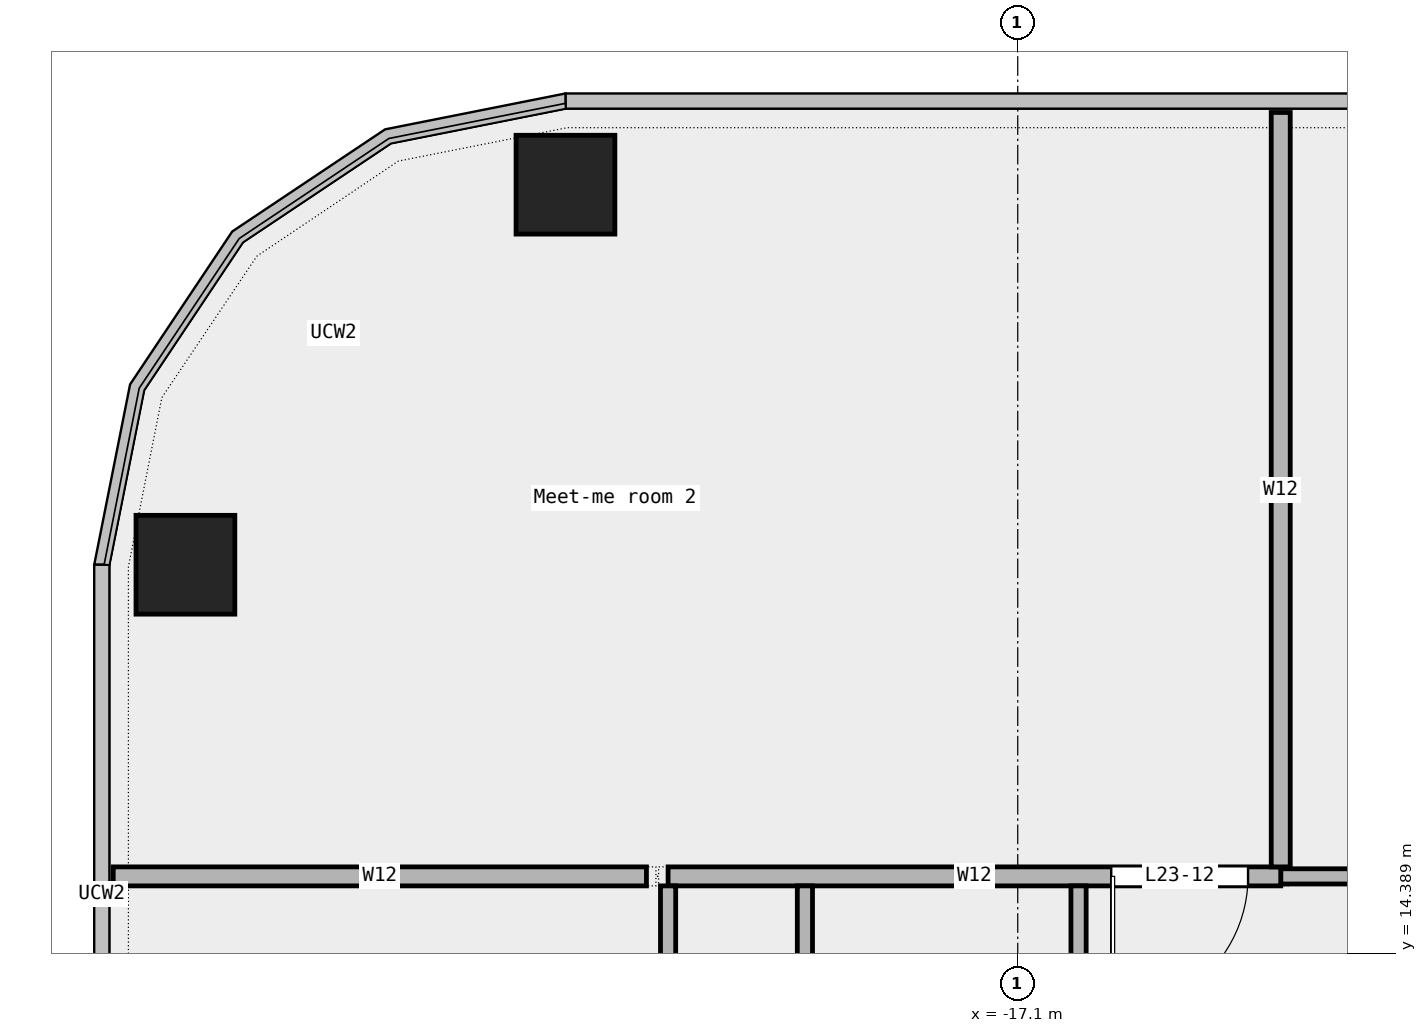
"""IFC4 building model, lengths in metres.
Left out: names, types, materials, properties, quantities, classifications, styles, units other than length and angle.
Written with IfcOpenShell. Run it as: python <this file> out.ifc"""

import sys

from ifc_helpers import new_model, si_unit, direction, frame, frame_2d, origin, origin_2d, place, context, subcontext, project, spatial, rectangle, extrude, element, fill, save


model = new_model("IFC4")
c1 = context("Model", 3, precision=1e-05, world=origin(), true_north=direction((0.0, 1.0)))
c2 = subcontext(c1, "Body", "Model", "MODEL_VIEW")
j1 = project(units=[si_unit("LENGTHUNIT", "METRE"), si_unit("PLANEANGLEUNIT", "RADIAN")], contexts=[c1])
p1 = place(None, origin())
s1 = spatial("IfcSite", under=j1, at=p1, CompositionType="ELEMENT")
p2 = place(p1, origin())
s2 = spatial("IfcBuilding", under=s1, at=p2, CompositionType="ELEMENT")
p3 = place(p2, frame((0.0, 0.0, 117.1)))
s3 = spatial("IfcBuildingStorey", under=s2, at=p3, CompositionType="ELEMENT", Elevation=117.1)
for number, where, z_axis, x_axis in (
    (1, (-23.05, 24.5, 0.0), (0.0, 0.0, 1.0), (1.0, 0.0, 0.0)),
    (2, (-28.05, 19.5, 0.0), (0.0, 0.0, 1.0), (1.0, 0.0, 0.0)),
):
    element("IfcColumn", number, at=place(p3, frame(where, z_axis=z_axis, x_axis=x_axis)), inside=s3, PredefinedType="COLUMN", context=c2, shape_type="SweptSolid", body=[
        extrude(rectangle(XDim=1.3, YDim=1.3, at=origin_2d()), origin(), (0.0, 0.0, 1.0), 4.05),
    ])
p4 = place(p3, frame((-13.64, 15.4, 0.0), z_axis=(0.0, 0.0, 1.0), x_axis=(1.0, 0.0, 0.0)))
e3 = element("IfcWall", 3, at=p4, inside=s3, PredefinedType="PARTITIONING", context=c2, shape_type="SweptSolid", body=[
    extrude(rectangle(XDim=12.125, YDim=0.2, at=frame_2d((6.062, 0.0))), origin(), (0.0, 0.0, 1.0), 4.05),
])
p5 = place(p4, frame((5.312, 0.0, 0.0)))
e4 = element("IfcOpeningElement", 4, at=p5, cuts=e3, PredefinedType="OPENING", context=c2, shape_type="SweptSolid", body=[
    extrude(rectangle(XDim=1.5, YDim=2.1, at=frame_2d((0.75, 1.05))), frame((0.0, 0.112, 0.0), z_axis=(0.0, -1.0, 0.0), x_axis=(1.0, 0.0, 0.0)), (0.0, 0.0, 1.0), 0.224),
])
p6 = place(p3, frame((-29.0, 15.4, 0.0), z_axis=(0.0, 0.0, 1.0), x_axis=(1.0, 0.0, 0.0)))
e5 = element("IfcWall", 5, at=p6, inside=s3, PredefinedType="PARTITIONING", context=c2, shape_type="SweptSolid", body=[
    extrude(rectangle(XDim=7.015, YDim=0.25, at=frame_2d((3.507, 0.0))), origin(), (0.0, 0.0, 1.0), 4.05),
])
p7 = place(p3, frame((-21.7, 15.4, 0.0), z_axis=(0.0, 0.0, 1.0), x_axis=(1.0, 0.0, 0.0)))
e6 = element("IfcWall", 6, at=p7, inside=s3, PredefinedType="PARTITIONING", context=c2, shape_type="SweptSolid", body=[
    extrude(rectangle(XDim=8.06, YDim=0.25, at=frame_2d((4.03, 0.0))), origin(), (0.0, 0.0, 1.0), 4.05),
])
p8 = place(p7, frame((5.83, 0.0, 0.0)))
e7 = element("IfcOpeningElement", 7, at=p8, cuts=e6, PredefinedType="OPENING", context=c2, shape_type="SweptSolid", body=[
    extrude(rectangle(XDim=1.8, YDim=2.1, at=frame_2d((0.9, 1.05))), frame((0.0, 0.137, 0.0), z_axis=(0.0, -1.0, 0.0), x_axis=(1.0, 0.0, 0.0)), (0.0, 0.0, 1.0), 0.274),
])
p9 = place(p3, frame((-21.7, -8.975, 0.0), z_axis=(0.0, 0.0, 1.0), x_axis=(0.0, 1.0, 0.0)))
e8 = element("IfcWall", 8, at=p9, inside=s3, PredefinedType="PARTITIONING", context=c2, shape_type="SweptSolid", body=[
    extrude(rectangle(XDim=24.25, YDim=0.2, at=frame_2d((12.125, 0.0))), origin(), (0.0, 0.0, 1.0), 4.05),
])
p10 = place(p9, frame((2.805, 0.0, 0.0)))
e9 = element("IfcOpeningElement", 9, at=p10, cuts=e8, PredefinedType="OPENING", context=c2, shape_type="SweptSolid", body=[
    extrude(rectangle(XDim=1.2, YDim=2.1, at=frame_2d((0.6, 1.05))), frame((0.0, 0.112, 0.0), z_axis=(0.0, -1.0, 0.0), x_axis=(1.0, 0.0, 0.0)), (0.0, 0.0, 1.0), 0.224),
])
p11 = place(p9, frame((21.58, 0.0, 0.0)))
e10 = element("IfcOpeningElement", 10, at=p11, cuts=e8, PredefinedType="OPENING", context=c2, shape_type="SweptSolid", body=[
    extrude(rectangle(XDim=0.9, YDim=2.1, at=frame_2d((0.45, 1.05))), frame((0.0, 0.112, 0.0), z_axis=(0.0, -1.0, 0.0), x_axis=(1.0, 0.0, 0.0)), (0.0, 0.0, 1.0), 0.224),
])
p12 = place(p9, frame((12.71, 0.0, 0.0)))
e11 = element("IfcOpeningElement", 11, at=p12, cuts=e8, PredefinedType="OPENING", context=c2, shape_type="SweptSolid", body=[
    extrude(rectangle(XDim=1.2, YDim=2.1, at=frame_2d((0.6, 1.05))), frame((0.0, 0.112, 0.0), z_axis=(0.0, -1.0, 0.0), x_axis=(1.0, 0.0, 0.0)), (0.0, 0.0, 1.0), 0.224),
])
p13 = place(p3, frame((-19.9, 9.85, 0.0), z_axis=(0.0, 0.0, 1.0), x_axis=(0.0, 1.0, 0.0)))
e12 = element("IfcWall", 12, at=p13, inside=s3, PredefinedType="PARTITIONING", context=c2, shape_type="SweptSolid", body=[
    extrude(rectangle(XDim=5.425, YDim=0.2, at=frame_2d((2.712, 0.0))), origin(), (0.0, 0.0, 1.0), 4.05),
])
p14 = place(p3, frame((-16.3, 11.75, 0.0), z_axis=(0.0, 0.0, 1.0), x_axis=(0.0, 1.0, 0.0)))
e13 = element("IfcWall", 13, at=p14, inside=s3, PredefinedType="PARTITIONING", context=c2, shape_type="SweptSolid", body=[
    extrude(rectangle(XDim=3.525, YDim=0.2, at=frame_2d((1.762, 0.0))), origin(), (0.0, 0.0, 1.0), 4.05),
])
p15 = place(p14, frame((1.312, 0.0, 0.0)))
e14 = element("IfcOpeningElement", 14, at=p15, cuts=e13, PredefinedType="OPENING", context=c2, shape_type="SweptSolid", body=[
    extrude(rectangle(XDim=0.9, YDim=2.1, at=frame_2d((0.45, 1.05))), frame((0.0, 0.112, 0.0), z_axis=(0.0, -1.0, 0.0), x_axis=(1.0, 0.0, 0.0)), (0.0, 0.0, 1.0), 0.224),
])
p16 = place(p3, frame((-13.64, 15.525, 0.0), z_axis=(0.0, 0.0, 1.0), x_axis=(0.0, 1.0, 0.0)))
e15 = element("IfcWall", 15, at=p16, inside=s3, PredefinedType="PARTITIONING", context=c2, shape_type="SweptSolid", body=[
    extrude(rectangle(XDim=9.925, YDim=0.25, at=frame_2d((4.962, 0.0))), origin(), (0.0, 0.0, 1.0), 4.05),
])
p17 = place(p8, origin())
e16 = element("IfcDoor", 16, at=p17, inside=s3, OperationType="DOUBLE_DOOR_SINGLE_SWING", PredefinedType="DOOR", context=c2, shape_type="SweptSolid", body=[
    extrude(rectangle(XDim=1.8, YDim=2.1, at=frame_2d((0.9, 1.05))), frame((0.0, 0.025, 0.0), z_axis=(0.0, -1.0, 0.0), x_axis=(1.0, 0.0, 0.0)), (0.0, 0.0, 1.0), 0.05),
])
fill(e7, e16)
save(model, sys.argv[1])
